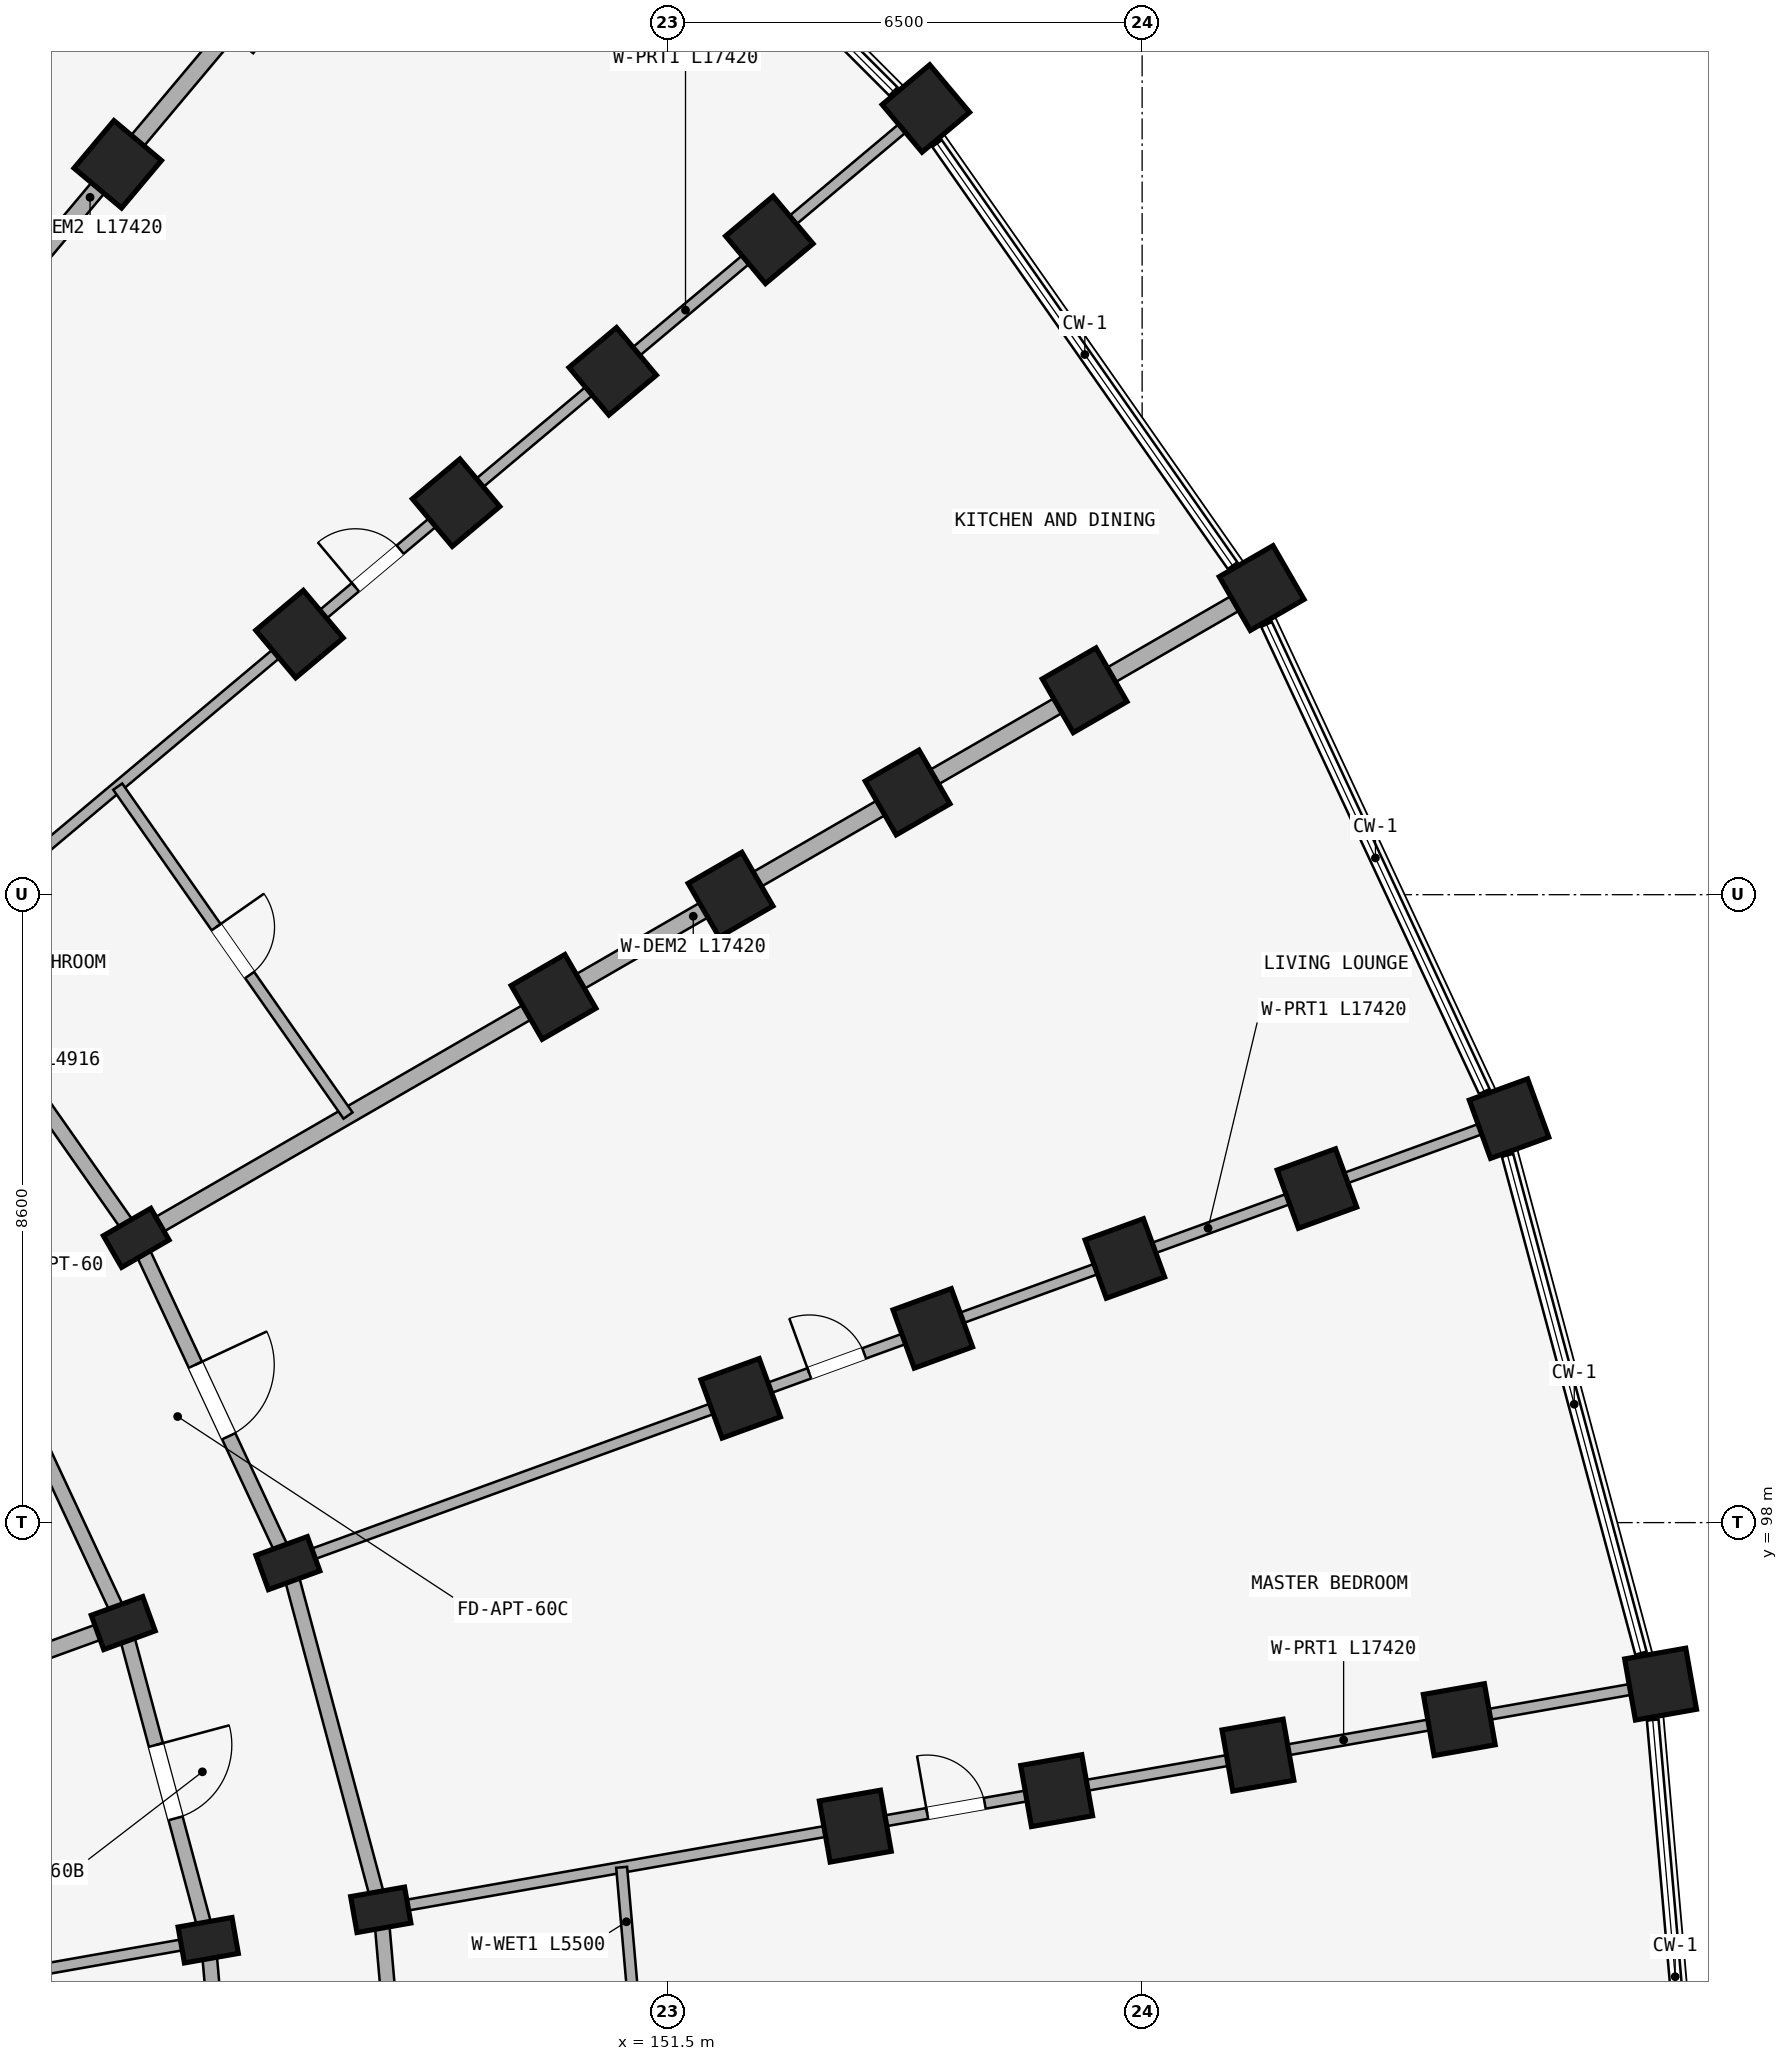
"""IFC4 building model, lengths in metres.
Left out: names, types, materials, properties, quantities, classifications, styles, units other than length and angle.
Written with IfcOpenShell. Run it as: python <this file> out.ifc"""

import sys

from ifc_helpers import new_model, si_unit, direction, frame, frame_2d, origin, origin_2d, place, context, subcontext, project, spatial, rectangle, extrude, element, fill, save


model = new_model("IFC4")
c1 = context("Model", 3, precision=1e-05, world=origin(), true_north=direction((0.0, 1.0)))
c2 = subcontext(c1, "Body", "Model", "MODEL_VIEW")
j1 = project(units=[si_unit("LENGTHUNIT", "METRE"), si_unit("PLANEANGLEUNIT", "RADIAN")], contexts=[c1])
p1 = place(None, origin())
s1 = spatial("IfcSite", under=j1, at=p1, CompositionType="ELEMENT")
p2 = place(p1, origin())
s2 = spatial("IfcBuilding", under=s1, at=p2, CompositionType="ELEMENT")
p3 = place(p2, frame((0.0, 0.0, 4.5)))
s3 = spatial("IfcBuildingStorey", under=s2, at=p3, CompositionType="ELEMENT", Elevation=4.5)
for number, where, z_axis, x_axis in (
    (1, (143.969, 116.603, 0.0), (0.0, 0.0, 1.0), (-0.766, 0.643, 0.0)),
    (2, (146.458, 110.169, 0.0), (0.0, 0.0, 1.0), (-0.643, 0.766, 0.0)),
    (3, (148.603, 111.969, 0.0), (0.0, 0.0, 1.0), (-0.643, 0.766, 0.0)),
    (4, (150.748, 113.769, 0.0), (0.0, 0.0, 1.0), (-0.643, 0.766, 0.0)),
    (5, (152.893, 115.568, 0.0), (0.0, 0.0, 1.0), (-0.643, 0.766, 0.0)),
    (6, (155.038, 117.368, 0.0), (0.0, 0.0, 1.0), (-0.643, 0.766, 0.0)),
):
    element("IfcColumn", number, at=place(p3, frame(where, z_axis=z_axis, x_axis=x_axis)), inside=s3, PredefinedType="COLUMN", context=c2, shape_type="SweptSolid", body=[
        extrude(rectangle(XDim=0.85, YDim=0.85, at=origin_2d()), origin(), (0.0, 0.0, 1.0), 3.98),
    ])
p4 = place(p3, frame((144.222, 101.9, 0.0), z_axis=(0.0, 0.0, 1.0), x_axis=(-0.5, 0.866025403784, 0.0)))
e7 = element("IfcColumn", 7, at=p4, inside=s3, PredefinedType="COLUMN", context=c2, shape_type="SweptSolid", body=[
    extrude(rectangle(XDim=0.5, YDim=0.75, at=origin_2d()), origin(), (0.0, 0.0, 1.0), 3.98),
])
for number, where, z_axis, x_axis in (
    (8, (149.938, 105.2, 0.0), (0.0, 0.0, 1.0), (-0.5, 0.866, 0.0)),
    (9, (152.363, 106.6, 0.0), (0.0, 0.0, 1.0), (-0.5, 0.866, 0.0)),
    (10, (154.787, 108.0, 0.0), (0.0, 0.0, 1.0), (-0.5, 0.866, 0.0)),
    (11, (157.212, 109.4, 0.0), (0.0, 0.0, 1.0), (-0.5, 0.866, 0.0)),
    (12, (159.637, 110.8, 0.0), (0.0, 0.0, 1.0), (-0.5, 0.866, 0.0)),
):
    element("IfcColumn", number, at=place(p3, frame(where, z_axis=z_axis, x_axis=x_axis)), inside=s3, PredefinedType="COLUMN", context=c2, shape_type="SweptSolid", body=[
        extrude(rectangle(XDim=0.85, YDim=0.85, at=origin_2d()), origin(), (0.0, 0.0, 1.0), 3.98),
    ])
for number, where, z_axis, x_axis in (
    (13, (144.044, 96.624, 0.0), (0.0, 0.0, 1.0), (-0.342, 0.94, 0.0)),
    (14, (146.299, 97.445, 0.0), (0.0, 0.0, 1.0), (-0.342, 0.94, 0.0)),
):
    element("IfcColumn", number, at=place(p3, frame(where, z_axis=z_axis, x_axis=x_axis)), inside=s3, PredefinedType="COLUMN", context=c2, shape_type="SweptSolid", body=[
        extrude(rectangle(XDim=0.5, YDim=0.75, at=origin_2d()), origin(), (0.0, 0.0, 1.0), 3.98),
    ])
for number, where, z_axis, x_axis in (
    (15, (152.501, 99.702, 0.0), (0.0, 0.0, 1.0), (-0.342, 0.94, 0.0)),
    (16, (155.132, 100.66, 0.0), (0.0, 0.0, 1.0), (-0.342, 0.94, 0.0)),
    (17, (157.764, 101.618, 0.0), (0.0, 0.0, 1.0), (-0.342, 0.94, 0.0)),
    (18, (160.395, 102.575, 0.0), (0.0, 0.0, 1.0), (-0.342, 0.94, 0.0)),
    (19, (163.026, 103.533, 0.0), (0.0, 0.0, 1.0), (-0.342, 0.94, 0.0)),
):
    element("IfcColumn", number, at=place(p3, frame(where, z_axis=z_axis, x_axis=x_axis)), inside=s3, PredefinedType="COLUMN", context=c2, shape_type="SweptSolid", body=[
        extrude(rectangle(XDim=0.85, YDim=0.85, at=origin_2d()), origin(), (0.0, 0.0, 1.0), 3.98),
    ])
for number, where, z_axis, x_axis in (
    (20, (145.208, 92.28, 0.0), (0.0, 0.0, 1.0), (-0.174, 0.985, 0.0)),
    (21, (147.572, 92.697, 0.0), (0.0, 0.0, 1.0), (-0.174, 0.985, 0.0)),
):
    element("IfcColumn", number, at=place(p3, frame(where, z_axis=z_axis, x_axis=x_axis)), inside=s3, PredefinedType="COLUMN", context=c2, shape_type="SweptSolid", body=[
        extrude(rectangle(XDim=0.5, YDim=0.75, at=origin_2d()), origin(), (0.0, 0.0, 1.0), 3.98),
    ])
for number, where, z_axis, x_axis in (
    (22, (154.071, 93.843, 0.0), (0.0, 0.0, 1.0), (-0.174, 0.985, 0.0)),
    (23, (156.829, 94.329, 0.0), (0.0, 0.0, 1.0), (-0.174, 0.985, 0.0)),
    (24, (159.586, 94.815, 0.0), (0.0, 0.0, 1.0), (-0.174, 0.985, 0.0)),
    (25, (162.344, 95.302, 0.0), (0.0, 0.0, 1.0), (-0.174, 0.985, 0.0)),
    (26, (165.101, 95.788, 0.0), (0.0, 0.0, 1.0), (-0.174, 0.985, 0.0)),
):
    element("IfcColumn", number, at=place(p3, frame(where, z_axis=z_axis, x_axis=x_axis)), inside=s3, PredefinedType="COLUMN", context=c2, shape_type="SweptSolid", body=[
        extrude(rectangle(XDim=0.85, YDim=0.85, at=origin_2d()), origin(), (0.0, 0.0, 1.0), 3.98),
    ])
p5 = place(p3, frame((141.402, 105.927, 0.0), z_axis=(0.0, 0.0, 1.0), x_axis=(0.573592335331, -0.819140911474, 0.0)))
e27 = element("IfcWall", 27, at=p5, inside=s3, PredefinedType="STANDARD", context=c2, shape_type="SweptSolid", body=[
    extrude(rectangle(XDim=4.916, YDim=0.2, at=frame_2d((2.458, 0.0))), origin(), (0.0, 0.0, 1.0), 3.322),
])
p6 = place(p3, frame((142.144, 100.7, 0.0), z_axis=(0.0, 0.0, 1.0), x_axis=(0.422617978463, -0.906307919131, 0.0)))
e28 = element("IfcWall", 28, at=p6, inside=s3, PredefinedType="STANDARD", context=c2, shape_type="SweptSolid", body=[
    extrude(rectangle(XDim=4.497, YDim=0.2, at=frame_2d((2.249, 0.0))), origin(), (0.0, 0.0, 1.0), 3.322),
])
p7 = place(p3, frame((144.222, 101.9, 0.0), z_axis=(0.0, 0.0, 1.0), x_axis=(0.422629854778, -0.906302381024, 0.0)))
e29 = element("IfcWall", 29, at=p7, inside=s3, PredefinedType="STANDARD", context=c2, shape_type="SweptSolid", body=[
    extrude(rectangle(XDim=4.915, YDim=0.2, at=frame_2d((2.458, 0.0))), origin(), (0.0, 0.0, 1.0), 3.322),
])
p8 = place(p7, frame((1.918, 0.0, 0.0)))
e30 = element("IfcOpeningElement", 30, at=p8, cuts=e29, PredefinedType="OPENING", context=c2, shape_type="SweptSolid", body=[
    extrude(rectangle(XDim=1.08, YDim=2.15, at=frame_2d((0.54, 1.075))), frame((0.0, 0.11, 0.0), z_axis=(0.0, -1.0, 0.0), x_axis=(1.0, 0.0, 0.0)), (0.0, 0.0, 1.0), 0.22),
])
p9 = place(p3, frame((144.044, 96.624, 0.0), z_axis=(0.0, 0.0, 1.0), x_axis=(0.258787642463, -0.965934240054, 0.0)))
e31 = element("IfcWall", 31, at=p9, inside=s3, PredefinedType="STANDARD", context=c2, shape_type="SweptSolid", body=[
    extrude(rectangle(XDim=4.497, YDim=0.2, at=frame_2d((2.249, 0.0))), origin(), (0.0, 0.0, 1.0), 3.322),
])
p10 = place(p9, frame((1.729, 0.0, 0.0)))
e32 = element("IfcOpeningElement", 32, at=p10, cuts=e31, PredefinedType="OPENING", context=c2, shape_type="SweptSolid", body=[
    extrude(rectangle(XDim=1.04, YDim=2.15, at=frame_2d((0.52, 1.075))), frame((0.0, 0.11, 0.0), z_axis=(0.0, -1.0, 0.0), x_axis=(1.0, 0.0, 0.0)), (0.0, 0.0, 1.0), 0.22),
])
p11 = place(p3, frame((146.299, 97.445, 0.0), z_axis=(0.0, 0.0, 1.0), x_axis=(0.258803112091, -0.965930095386, 0.0)))
e33 = element("IfcWall", 33, at=p11, inside=s3, PredefinedType="STANDARD", context=c2, shape_type="SweptSolid", body=[
    extrude(rectangle(XDim=4.916, YDim=0.2, at=frame_2d((2.458, 0.0))), origin(), (0.0, 0.0, 1.0), 3.322),
])
p12 = place(p3, frame((145.208, 92.28, 0.0), z_axis=(0.0, 0.0, 1.0), x_axis=(0.087187153726, -0.996191949488, 0.0)))
e34 = element("IfcWall", 34, at=p12, inside=s3, PredefinedType="STANDARD", context=c2, shape_type="SweptSolid", body=[
    extrude(rectangle(XDim=4.497, YDim=0.2, at=frame_2d((2.249, 0.0))), origin(), (0.0, 0.0, 1.0), 3.322),
])
p13 = place(p3, frame((147.572, 92.697, 0.0), z_axis=(0.0, 0.0, 1.0), x_axis=(0.087167566415, -0.996193663584, 0.0)))
e35 = element("IfcWall", 35, at=p13, inside=s3, PredefinedType="STANDARD", context=c2, shape_type="SweptSolid", body=[
    extrude(rectangle(XDim=4.916, YDim=0.2, at=frame_2d((2.458, 0.0))), origin(), (0.0, 0.0, 1.0), 3.322),
])
p14 = place(p3, frame((137.991, 109.479, 0.0), z_axis=(0.0, 0.0, 1.0), x_axis=(0.642784757967, 0.766046835987, 0.0)))
e36 = element("IfcWall", 36, at=p14, inside=s3, PredefinedType="STANDARD", context=c2, shape_type="SweptSolid", body=[
    extrude(rectangle(XDim=17.42, YDim=0.23, at=frame_2d((8.71, 0.0))), origin(), (0.0, 0.0, 1.0), 3.322),
])
p15 = place(p3, frame((141.479, 105.991, 0.0), z_axis=(0.0, 0.0, 1.0), x_axis=(0.766046835987, 0.642784757967, 0.0)))
e37 = element("IfcWall", 37, at=p15, inside=s3, PredefinedType="PARTITIONING", context=c2, shape_type="SweptSolid", body=[
    extrude(rectangle(XDim=17.42, YDim=0.15, at=frame_2d((8.71, 0.0))), origin(), (0.0, 0.0, 1.0), 3.322),
])
p16 = place(p15, frame((7.5, 0.0, 0.0)))
e38 = element("IfcOpeningElement", 38, at=p16, cuts=e37, PredefinedType="OPENING", context=c2, shape_type="SweptSolid", body=[
    extrude(rectangle(XDim=0.8, YDim=2.1, at=frame_2d((0.4, 1.05))), frame((0.0, 0.085, 0.0), z_axis=(0.0, -1.0, 0.0), x_axis=(1.0, 0.0, 0.0)), (0.0, 0.0, 1.0), 0.17),
])
p17 = place(p3, frame((144.309, 101.95, 0.0), z_axis=(0.0, 0.0, 1.0), x_axis=(0.866026648973, 0.499997843263, 0.0)))
e39 = element("IfcWall", 39, at=p17, inside=s3, PredefinedType="STANDARD", context=c2, shape_type="SweptSolid", body=[
    extrude(rectangle(XDim=17.42, YDim=0.23, at=frame_2d((8.71, 0.0))), origin(), (0.0, 0.0, 1.0), 3.322),
])
p18 = place(p3, frame((137.654, 94.298, 0.0), z_axis=(0.0, 0.0, 1.0), x_axis=(0.939696231917, 0.342010221662, 0.0)))
e40 = element("IfcWall", 40, at=p18, inside=s3, PredefinedType="STANDARD", context=c2, shape_type="SweptSolid", body=[
    extrude(rectangle(XDim=6.75, YDim=0.22, at=frame_2d((3.375, 0.0))), origin(), (0.0, 0.0, 1.0), 3.322),
])
p19 = place(p3, frame((146.393, 97.479, 0.0), z_axis=(0.0, 0.0, 1.0), x_axis=(0.939691901159, 0.342022120477, 0.0)))
e41 = element("IfcWall", 41, at=p19, inside=s3, PredefinedType="PARTITIONING", context=c2, shape_type="SweptSolid", body=[
    extrude(rectangle(XDim=17.42, YDim=0.15, at=frame_2d((8.71, 0.0))), origin(), (0.0, 0.0, 1.0), 3.322),
])
p20 = place(p19, frame((7.5, 0.0, 0.0)))
e42 = element("IfcOpeningElement", 42, at=p20, cuts=e41, PredefinedType="OPENING", context=c2, shape_type="SweptSolid", body=[
    extrude(rectangle(XDim=0.8, YDim=2.1, at=frame_2d((0.4, 1.05))), frame((0.0, 0.085, 0.0), z_axis=(0.0, -1.0, 0.0), x_axis=(1.0, 0.0, 0.0)), (0.0, 0.0, 1.0), 0.17),
])
p21 = place(p3, frame((138.511, 91.099, 0.0), z_axis=(0.0, 0.0, 1.0), x_axis=(0.984807944945, 0.173647089161, 0.0)))
e43 = element("IfcWall", 43, at=p21, inside=s3, PredefinedType="PARTITIONING", context=c2, shape_type="SweptSolid", body=[
    extrude(rectangle(XDim=6.75, YDim=0.15, at=frame_2d((3.375, 0.0))), origin(), (0.0, 0.0, 1.0), 3.322),
])
p22 = place(p21, frame((3.242, 0.0, 0.0)))
e44 = element("IfcOpeningElement", 44, at=p22, cuts=e43, PredefinedType="OPENING", context=c2, shape_type="SweptSolid", body=[
    extrude(rectangle(XDim=0.94, YDim=2.1, at=frame_2d((0.47, 1.05))), frame((0.0, 0.085, 0.0), z_axis=(0.0, -1.0, 0.0), x_axis=(1.0, 0.0, 0.0)), (0.0, 0.0, 1.0), 0.17),
])
p23 = place(p3, frame((147.67, 92.714, 0.0), z_axis=(0.0, 0.0, 1.0), x_axis=(0.984808098809, 0.173646216546, 0.0)))
e45 = element("IfcWall", 45, at=p23, inside=s3, PredefinedType="PARTITIONING", context=c2, shape_type="SweptSolid", body=[
    extrude(rectangle(XDim=17.42, YDim=0.15, at=frame_2d((8.71, 0.0))), origin(), (0.0, 0.0, 1.0), 3.322),
])
p24 = place(p23, frame((7.5, 0.0, 0.0)))
e46 = element("IfcOpeningElement", 46, at=p24, cuts=e45, PredefinedType="OPENING", context=c2, shape_type="SweptSolid", body=[
    extrude(rectangle(XDim=0.8, YDim=2.1, at=frame_2d((0.4, 1.05))), frame((0.0, 0.085, 0.0), z_axis=(0.0, -1.0, 0.0), x_axis=(1.0, 0.0, 0.0)), (0.0, 0.0, 1.0), 0.17),
])
p25 = place(p3, frame((143.969, 108.08, 0.0), z_axis=(0.0, 0.0, 1.0), x_axis=(0.573569599955, -0.819156831143, 0.0)))
e47 = element("IfcWall", 47, at=p25, inside=s3, PredefinedType="PLUMBINGWALL", context=c2, shape_type="SweptSolid", body=[
    extrude(rectangle(XDim=5.5, YDim=0.15, at=frame_2d((2.75, 0.0))), origin(), (0.0, 0.0, 1.0), 3.322),
])
p26 = place(p25, frame((2.35, 0.0, 0.0)))
e48 = element("IfcOpeningElement", 48, at=p26, cuts=e47, PredefinedType="OPENING", context=c2, shape_type="SweptSolid", body=[
    extrude(rectangle(XDim=0.8, YDim=2.1, at=frame_2d((0.4, 1.05))), frame((0.0, 0.085, 0.0), z_axis=(0.0, -1.0, 0.0), x_axis=(1.0, 0.0, 0.0)), (0.0, 0.0, 1.0), 0.17),
])
p27 = place(p3, frame((150.871, 93.279, 0.0), z_axis=(0.0, 0.0, 1.0), x_axis=(0.087188978393, -0.996191789791, 0.0)))
e49 = element("IfcWall", 49, at=p27, inside=s3, PredefinedType="PLUMBINGWALL", context=c2, shape_type="SweptSolid", body=[
    extrude(rectangle(XDim=5.5, YDim=0.15, at=frame_2d((2.75, 0.0))), origin(), (0.0, 0.0, 1.0), 3.322),
])
p28 = place(p27, frame((2.35, 0.0, 0.0)))
e50 = element("IfcOpeningElement", 50, at=p28, cuts=e49, PredefinedType="OPENING", context=c2, shape_type="SweptSolid", body=[
    extrude(rectangle(XDim=0.8, YDim=2.1, at=frame_2d((0.4, 1.05))), frame((0.0, 0.085, 0.0), z_axis=(0.0, -1.0, 0.0), x_axis=(1.0, 0.0, 0.0)), (0.0, 0.0, 1.0), 0.17),
])
p29 = place(p16, origin())
e51 = element("IfcDoor", 51, at=p29, inside=s3, OperationType="SINGLE_SWING_LEFT", PredefinedType="DOOR", context=c2, shape_type="SweptSolid", body=[
    extrude(rectangle(XDim=0.8, YDim=2.1, at=frame_2d((0.4, 1.05))), frame((0.0, 0.025, 0.0), z_axis=(0.0, -1.0, 0.0), x_axis=(1.0, 0.0, 0.0)), (0.0, 0.0, 1.0), 0.05),
])
fill(e38, e51)
p30 = place(p20, origin())
e52 = element("IfcDoor", 52, at=p30, inside=s3, OperationType="SINGLE_SWING_LEFT", PredefinedType="DOOR", context=c2, shape_type="SweptSolid", body=[
    extrude(rectangle(XDim=0.8, YDim=2.1, at=frame_2d((0.4, 1.05))), frame((0.0, 0.025, 0.0), z_axis=(0.0, -1.0, 0.0), x_axis=(1.0, 0.0, 0.0)), (0.0, 0.0, 1.0), 0.05),
])
fill(e42, e52)
p31 = place(p24, origin())
e53 = element("IfcDoor", 53, at=p31, inside=s3, OperationType="SINGLE_SWING_LEFT", PredefinedType="DOOR", context=c2, shape_type="SweptSolid", body=[
    extrude(rectangle(XDim=0.8, YDim=2.1, at=frame_2d((0.4, 1.05))), frame((0.0, 0.025, 0.0), z_axis=(0.0, -1.0, 0.0), x_axis=(1.0, 0.0, 0.0)), (0.0, 0.0, 1.0), 0.05),
])
fill(e46, e53)
p32 = place(p26, frame((0.8, 0.0, 0.0), z_axis=(0.0, 0.0, 1.0), x_axis=(-1.0, 0.0, 0.0)))
e54 = element("IfcDoor", 54, at=p32, inside=s3, OperationType="SINGLE_SWING_RIGHT", PredefinedType="DOOR", context=c2, shape_type="SweptSolid", body=[
    extrude(rectangle(XDim=0.8, YDim=2.1, at=frame_2d((0.4, 1.05))), frame((0.0, 0.025, 0.0), z_axis=(0.0, -1.0, 0.0), x_axis=(1.0, 0.0, 0.0)), (0.0, 0.0, 1.0), 0.05),
])
fill(e48, e54)
p33 = place(p8, origin())
e55 = element("IfcDoor", 55, at=p33, inside=s3, OperationType="SINGLE_SWING_LEFT", PredefinedType="DOOR", context=c2, shape_type="SweptSolid", body=[
    extrude(rectangle(XDim=1.08, YDim=2.15, at=frame_2d((0.54, 1.075))), frame((0.0, 0.025, 0.0), z_axis=(0.0, -1.0, 0.0), x_axis=(1.0, 0.0, 0.0)), (0.0, 0.0, 1.0), 0.05),
])
fill(e30, e55)
p34 = place(p10, frame((1.04, 0.0, 0.0), z_axis=(0.0, 0.0, 1.0), x_axis=(-1.0, 0.0, 0.0)))
e56 = element("IfcDoor", 56, at=p34, inside=s3, OperationType="SINGLE_SWING_RIGHT", PredefinedType="DOOR", context=c2, shape_type="SweptSolid", body=[
    extrude(rectangle(XDim=1.04, YDim=2.15, at=frame_2d((0.52, 1.075))), frame((0.0, 0.025, 0.0), z_axis=(0.0, -1.0, 0.0), x_axis=(1.0, 0.0, 0.0)), (0.0, 0.0, 1.0), 0.05),
])
fill(e32, e56)
save(model, sys.argv[1])
